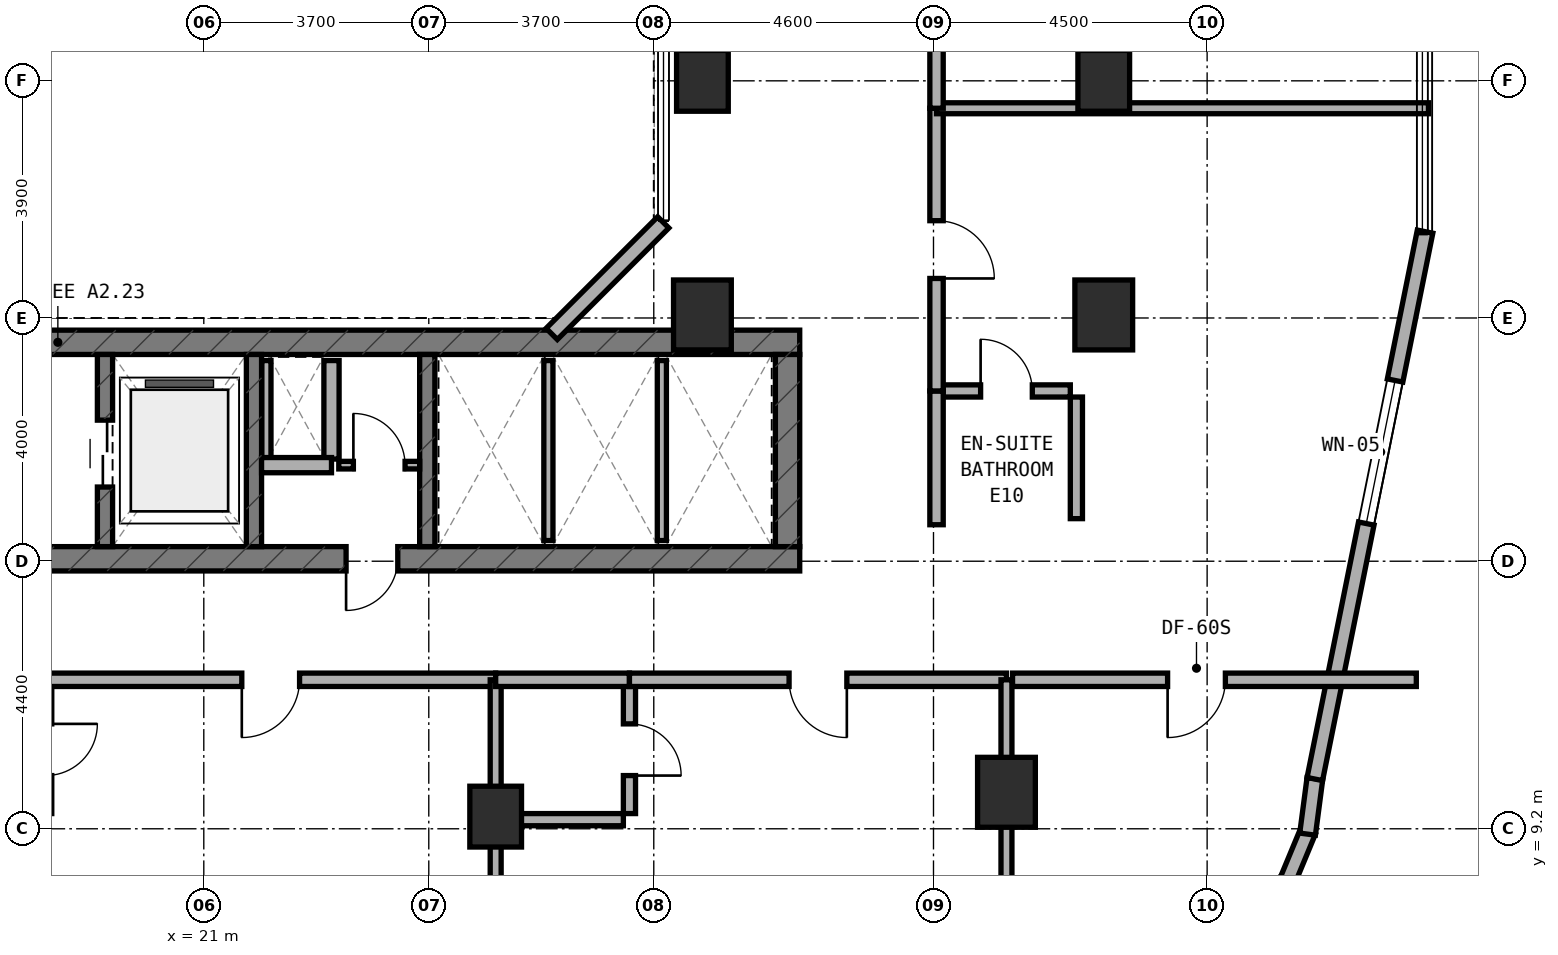
"""IFC4 building model, lengths in metres.
Left out: names, types, materials, properties, quantities, classifications, styles, units other than length and angle.
Written with IfcOpenShell. Run it as: python <this file> out.ifc"""

import sys

from ifc_helpers import new_model, si_unit, direction, frame, frame_2d, origin, origin_2d, place, context, subcontext, project, spatial, rectangle, extrude, element, fill, save


model = new_model("IFC4")
c1 = context("Model", 3, precision=1e-05, world=origin(), true_north=direction((0.0, 1.0)))
c2 = subcontext(c1, "Body", "Model", "MODEL_VIEW")
j1 = project(units=[si_unit("LENGTHUNIT", "METRE"), si_unit("PLANEANGLEUNIT", "RADIAN")], contexts=[c1])
p1 = place(None, origin())
s1 = spatial("IfcSite", under=j1, at=p1, CompositionType="ELEMENT")
p2 = place(p1, origin())
s2 = spatial("IfcBuilding", under=s1, at=p2, CompositionType="ELEMENT")
p3 = place(p2, frame((0.0, 0.0, 98.5)))
s3 = spatial("IfcBuildingStorey", under=s2, at=p3, CompositionType="ELEMENT", Elevation=98.5)
p4 = place(p3, frame((6.4, 13.64, 0.0), z_axis=(0.0, 0.0, 1.0), x_axis=(1.0, 0.0, 0.0)))
e1 = element("IfcWall", 1, at=p4, inside=s3, PredefinedType="SHEAR", context=c2, shape_type="SweptSolid", body=[
    extrude(rectangle(XDim=24.4, YDim=0.4, at=frame_2d((12.2, 0.0))), origin(), (0.0, 0.0, 1.0), 3.5),
])
p5 = place(p4, frame((9.15, 0.0, 0.0)))
e2 = element("IfcOpeningElement", 2, at=p5, cuts=e1, PredefinedType="OPENING", context=c2, shape_type="SweptSolid", body=[
    extrude(rectangle(XDim=1.2, YDim=2.15, at=frame_2d((0.6, 1.075))), frame((0.0, 0.21, 0.0), z_axis=(0.0, -1.0, 0.0), x_axis=(1.0, 0.0, 0.0)), (0.0, 0.0, 1.0), 0.42),
])
p6 = place(p4, frame((16.94, 0.0, 0.0)))
e3 = element("IfcOpeningElement", 3, at=p6, cuts=e1, PredefinedType="OPENING", context=c2, shape_type="SweptSolid", body=[
    extrude(rectangle(XDim=0.85, YDim=2.1, at=frame_2d((0.425, 1.05))), frame((0.0, 0.21, 0.0), z_axis=(0.0, -1.0, 0.0), x_axis=(1.0, 0.0, 0.0)), (0.0, 0.0, 1.0), 0.42),
])
p7 = place(p3, frame((6.4, 17.2, 0.0), z_axis=(0.0, 0.0, 1.0), x_axis=(1.0, 0.0, 0.0)))
e4 = element("IfcWall", 4, at=p7, inside=s3, PredefinedType="SHEAR", context=c2, shape_type="SweptSolid", body=[
    extrude(rectangle(XDim=24.4, YDim=0.4, at=frame_2d((12.2, 0.0))), origin(), (0.0, 0.0, 1.0), 3.5),
])
p8 = place(p3, frame((30.6, 13.84, 0.0), z_axis=(0.0, 0.0, 1.0), x_axis=(0.0, 1.0, 0.0)))
e5 = element("IfcWall", 5, at=p8, inside=s3, PredefinedType="SHEAR", context=c2, shape_type="SweptSolid", body=[
    extrude(rectangle(XDim=3.16, YDim=0.4, at=frame_2d((1.58, 0.0))), origin(), (0.0, 0.0, 1.0), 3.5),
])
p9 = place(p3, frame((19.375, 13.84, 0.0), z_axis=(0.0, 0.0, 1.0), x_axis=(0.0, 1.0, 0.0)))
e6 = element("IfcWall", 6, at=p9, inside=s3, PredefinedType="STANDARD", context=c2, shape_type="SweptSolid", body=[
    extrude(rectangle(XDim=3.16, YDim=0.25, at=frame_2d((1.58, 0.0))), origin(), (0.0, 0.0, 1.0), 3.22),
])
p10 = place(p9, frame((0.98, 0.0, 0.0)))
e7 = element("IfcOpeningElement", 7, at=p10, cuts=e6, PredefinedType="OPENING", context=c2, shape_type="SweptSolid", body=[
    extrude(rectangle(XDim=1.1, YDim=2.15, at=frame_2d((0.55, 1.075))), frame((0.0, 0.135, 0.0), z_axis=(0.0, -1.0, 0.0), x_axis=(1.0, 0.0, 0.0)), (0.0, 0.0, 1.0), 0.27),
])
for number, where, z_axis, x_axis in (
    (8, (21.825, 13.84, 0.0), (0.0, 0.0, 1.0), (0.0, 1.0, 0.0)),
    (9, (24.675, 13.84, 0.0), (0.0, 0.0, 1.0), (0.0, 1.0, 0.0)),
):
    element("IfcWall", number, at=place(p3, frame(where, z_axis=z_axis, x_axis=x_axis)), inside=s3, PredefinedType="STANDARD", context=c2, shape_type="SweptSolid", body=[
        extrude(rectangle(XDim=3.16, YDim=0.25, at=frame_2d((1.58, 0.0))), origin(), (0.0, 0.0, 1.0), 3.22),
    ])
p11 = place(p3, frame((25.8, 9.4, 0.0), z_axis=(0.0, 0.0, 1.0), x_axis=(1.0, 0.0, 0.0)))
e10 = element("IfcColumn", 10, at=p11, inside=s3, PredefinedType="COLUMN", context=c2, shape_type="SweptSolid", body=[
    extrude(rectangle(XDim=0.85, YDim=1.0, at=origin_2d()), origin(), (0.0, 0.0, 1.0), 3.5),
])
p12 = place(p3, frame((34.2, 9.8, 0.0), z_axis=(0.0, 0.0, 1.0), x_axis=(1.0, 0.0, 0.0)))
e11 = element("IfcColumn", 11, at=p12, inside=s3, PredefinedType="COLUMN", context=c2, shape_type="SweptSolid", body=[
    extrude(rectangle(XDim=0.95, YDim=1.15, at=origin_2d()), origin(), (0.0, 0.0, 1.0), 3.5),
])
p13 = place(p3, frame((35.8, 21.5, 0.0), z_axis=(0.0, 0.0, 1.0), x_axis=(1.0, 0.0, 0.0)))
e12 = element("IfcColumn", 12, at=p13, inside=s3, PredefinedType="COLUMN", context=c2, shape_type="SweptSolid", body=[
    extrude(rectangle(XDim=0.85, YDim=1.0, at=origin_2d()), origin(), (0.0, 0.0, 1.0), 3.5),
])
for number, where, z_axis, x_axis in (
    (13, (35.8, 17.65, 0.0), (0.0, 0.0, 1.0), (1.0, 0.0, 0.0)),
    (14, (29.2, 17.65, 0.0), (0.0, 0.0, 1.0), (1.0, 0.0, 0.0)),
):
    element("IfcColumn", number, at=place(p3, frame(where, z_axis=z_axis, x_axis=x_axis)), inside=s3, PredefinedType="COLUMN", context=c2, shape_type="SweptSolid", body=[
        extrude(rectangle(XDim=0.95, YDim=1.15, at=origin_2d()), origin(), (0.0, 0.0, 1.0), 3.5),
    ])
p14 = place(p3, frame((29.2, 21.5, 0.0), z_axis=(0.0, 0.0, 1.0), x_axis=(1.0, 0.0, 0.0)))
e15 = element("IfcColumn", 15, at=p14, inside=s3, PredefinedType="COLUMN", context=c2, shape_type="SweptSolid", body=[
    extrude(rectangle(XDim=0.85, YDim=1.0, at=origin_2d()), origin(), (0.0, 0.0, 1.0), 3.5),
])
p15 = place(p3, frame((38.286, 7.655, 0.0), z_axis=(0.0, 0.0, 1.0), x_axis=(0.608494022858, 0.793558456666, 0.0)))
e16 = element("IfcWall", 16, at=p15, inside=s3, PredefinedType="STANDARD", context=c2, shape_type="SweptSolid", body=[
    extrude(rectangle(XDim=0.902, YDim=0.26, at=frame_2d((0.451, 0.0))), origin(), (0.0, 0.0, 1.0), 3.22),
])
p16 = place(p3, frame((38.814, 8.327, 0.0), z_axis=(0.0, 0.0, 1.0), x_axis=(0.383155708213, 0.923683767999, 0.0)))
e17 = element("IfcWall", 17, at=p16, inside=s3, PredefinedType="STANDARD", context=c2, shape_type="SweptSolid", body=[
    extrude(rectangle(XDim=0.903, YDim=0.26, at=frame_2d((0.451, 0.0))), origin(), (0.0, 0.0, 1.0), 3.22),
])
p17 = place(p3, frame((39.152, 9.112, 0.0), z_axis=(0.0, 0.0, 1.0), x_axis=(0.130200706103, 0.991487658083, 0.0)))
e18 = element("IfcWall", 18, at=p17, inside=s3, PredefinedType="STANDARD", context=c2, shape_type="SweptSolid", body=[
    extrude(rectangle(XDim=0.921, YDim=0.26, at=frame_2d((0.46, 0.0))), origin(), (0.0, 0.0, 1.0), 3.22),
])
p18 = place(p3, frame((39.271, 10.018, 0.0), z_axis=(0.0, 0.0, 1.0), x_axis=(0.197435082048, 0.980315963543, 0.0)))
e19 = element("IfcWall", 19, at=p18, inside=s3, PredefinedType="STANDARD", context=c2, shape_type="SweptSolid", body=[
    extrude(rectangle(XDim=9.183, YDim=0.26, at=frame_2d((4.591, 0.0))), origin(), (0.0, 0.0, 1.0), 3.22),
])
p19 = place(p18, frame((4.286, 0.0, 0.8)))
e20 = element("IfcOpeningElement", 20, at=p19, cuts=e19, PredefinedType="OPENING", context=c2, shape_type="SweptSolid", body=[
    extrude(rectangle(XDim=2.4, YDim=1.6, at=frame_2d((1.2, 0.8))), frame((0.0, 0.14, 0.0), z_axis=(0.0, -1.0, 0.0), x_axis=(1.0, 0.0, 0.0)), (0.0, 0.0, 1.0), 0.28),
])
p20 = place(p3, frame((26.722, 17.338, 0.0), z_axis=(0.0, 0.0, 1.0), x_axis=(0.707059717605, 0.707153841636, 0.0)))
e21 = element("IfcWall", 21, at=p20, inside=s3, PredefinedType="STANDARD", context=c2, shape_type="SweptSolid", body=[
    extrude(rectangle(XDim=2.594, YDim=0.26, at=frame_2d((1.297, 0.0))), origin(), (0.0, 0.0, 1.0), 3.22),
])
p21 = place(p3, frame((22.03, 15.28, 0.0), z_axis=(0.0, 0.0, 1.0), x_axis=(0.0, 1.0, 0.0)))
e22 = element("IfcWall", 22, at=p21, inside=s3, PredefinedType="PARTITIONING", context=c2, shape_type="SweptSolid", body=[
    extrude(rectangle(XDim=1.62, YDim=0.15, at=frame_2d((0.81, 0.0))), origin(), (0.0, 0.0, 1.0), 3.22),
])
p22 = place(p3, frame((23.1, 15.28, 0.0), z_axis=(0.0, 0.0, 1.0), x_axis=(0.0, 1.0, 0.0)))
e23 = element("IfcWall", 23, at=p22, inside=s3, PredefinedType="SOLIDWALL", context=c2, shape_type="SweptSolid", body=[
    extrude(rectangle(XDim=1.62, YDim=0.25, at=frame_2d((0.81, 0.0))), origin(), (0.0, 0.0, 1.0), 3.22),
])
p23 = place(p3, frame((21.95, 15.18, 0.0), z_axis=(0.0, 0.0, 1.0), x_axis=(1.0, 0.0, 0.0)))
e24 = element("IfcWall", 24, at=p23, inside=s3, PredefinedType="SOLIDWALL", context=c2, shape_type="SweptSolid", body=[
    extrude(rectangle(XDim=1.15, YDim=0.25, at=frame_2d((0.575, 0.0))), origin(), (0.0, 0.0, 1.0), 3.22),
])
p24 = place(p3, frame((23.22, 15.18, 0.0), z_axis=(0.0, 0.0, 1.0), x_axis=(1.0, 0.0, 0.0)))
e25 = element("IfcWall", 25, at=p24, inside=s3, PredefinedType="PARTITIONING", context=c2, shape_type="SweptSolid", body=[
    extrude(rectangle(XDim=1.33, YDim=0.125, at=frame_2d((0.665, 0.0))), origin(), (0.0, 0.0, 1.0), 3.22),
])
p25 = place(p24, frame((0.24, 0.0, 0.0)))
e26 = element("IfcOpeningElement", 26, at=p25, cuts=e25, PredefinedType="OPENING", context=c2, shape_type="SweptSolid", body=[
    extrude(rectangle(XDim=0.85, YDim=2.1, at=frame_2d((0.425, 1.05))), frame((0.0, 0.073, 0.0), z_axis=(0.0, -1.0, 0.0), x_axis=(1.0, 0.0, 0.0)), (0.0, 0.0, 1.0), 0.145),
])
p26 = place(p3, frame((26.667, 13.94, 0.0), z_axis=(0.0, 0.0, 1.0), x_axis=(0.0, 1.0, 0.0)))
e27 = element("IfcWall", 27, at=p26, inside=s3, PredefinedType="PARTITIONING", context=c2, shape_type="SweptSolid", body=[
    extrude(rectangle(XDim=2.96, YDim=0.15, at=frame_2d((1.48, 0.0))), origin(), (0.0, 0.0, 1.0), 3.22),
])
p27 = place(p3, frame((28.533, 13.94, 0.0), z_axis=(0.0, 0.0, 1.0), x_axis=(0.0, 1.0, 0.0)))
e28 = element("IfcWall", 28, at=p27, inside=s3, PredefinedType="PARTITIONING", context=c2, shape_type="SweptSolid", body=[
    extrude(rectangle(XDim=2.96, YDim=0.15, at=frame_2d((1.48, 0.0))), origin(), (0.0, 0.0, 1.0), 2.595),
])
p28 = place(p3, frame((18.4, 11.65, 0.0), z_axis=(0.0, 0.0, 1.0), x_axis=(1.0, 0.0, 0.0)))
e29 = element("IfcWall", 29, at=p28, inside=s3, PredefinedType="SOLIDWALL", context=c2, shape_type="SweptSolid", body=[
    extrude(rectangle(XDim=7.4, YDim=0.22, at=frame_2d((3.7, 0.0))), origin(), (0.0, 0.0, 1.0), 2.595),
])
p29 = place(p28, frame((3.225, 0.0, 0.0)))
e30 = element("IfcOpeningElement", 30, at=p29, cuts=e29, PredefinedType="OPENING", context=c2, shape_type="SweptSolid", body=[
    extrude(rectangle(XDim=0.95, YDim=2.1, at=frame_2d((0.475, 1.05))), frame((0.0, 0.12, 0.0), z_axis=(0.0, -1.0, 0.0), x_axis=(1.0, 0.0, 0.0)), (0.0, 0.0, 1.0), 0.24),
])
p30 = place(p3, frame((25.8, 4.86, 0.0), z_axis=(0.0, 0.0, 1.0), x_axis=(0.0, 1.0, 0.0)))
e31 = element("IfcWall", 31, at=p30, inside=s3, PredefinedType="SOLIDWALL", context=c2, shape_type="SweptSolid", body=[
    extrude(rectangle(XDim=6.79, YDim=0.18, at=frame_2d((3.395, 0.0))), origin(), (0.0, 0.0, 1.0), 2.595),
])
p31 = place(p3, frame((28.0, 9.45, 0.0), z_axis=(0.0, 0.0, 1.0), x_axis=(0.0, 1.0, 0.0)))
e32 = element("IfcWall", 32, at=p31, inside=s3, PredefinedType="PLUMBINGWALL", context=c2, shape_type="SweptSolid", body=[
    extrude(rectangle(XDim=2.1, YDim=0.2, at=frame_2d((1.05, 0.0))), origin(), (0.0, 0.0, 1.0), 2.835),
])
p32 = place(p31, frame((0.625, 0.0, 0.0)))
e33 = element("IfcOpeningElement", 33, at=p32, cuts=e32, PredefinedType="OPENING", context=c2, shape_type="SweptSolid", body=[
    extrude(rectangle(XDim=0.85, YDim=2.1, at=frame_2d((0.425, 1.05))), frame((0.0, 0.11, 0.0), z_axis=(0.0, -1.0, 0.0), x_axis=(1.0, 0.0, 0.0)), (0.0, 0.0, 1.0), 0.22),
])
p33 = place(p3, frame((25.9, 9.35, 0.0), z_axis=(0.0, 0.0, 1.0), x_axis=(1.0, 0.0, 0.0)))
e34 = element("IfcWall", 34, at=p33, inside=s3, PredefinedType="PLUMBINGWALL", context=c2, shape_type="SweptSolid", body=[
    extrude(rectangle(XDim=2.0, YDim=0.2, at=frame_2d((1.0, 0.0))), origin(), (0.0, 0.0, 1.0), 2.835),
])
p34 = place(p3, frame((25.8, 11.65, 0.0), z_axis=(0.0, 0.0, 1.0), x_axis=(1.0, 0.0, 0.0)))
e35 = element("IfcWall", 35, at=p34, inside=s3, PredefinedType="SOLIDWALL", context=c2, shape_type="SweptSolid", body=[
    extrude(rectangle(XDim=2.2, YDim=0.22, at=frame_2d((1.1, 0.0))), origin(), (0.0, 0.0, 1.0), 2.595),
])
p35 = place(p3, frame((28.0, 11.65, 0.0), z_axis=(0.0, 0.0, 1.0), x_axis=(1.0, 0.0, 0.0)))
e36 = element("IfcWall", 36, at=p35, inside=s3, PredefinedType="SOLIDWALL", context=c2, shape_type="SweptSolid", body=[
    extrude(rectangle(XDim=6.2, YDim=0.22, at=frame_2d((3.1, 0.0))), origin(), (0.0, 0.0, 1.0), 2.595),
])
p36 = place(p35, frame((2.625, 0.0, 0.0)))
e37 = element("IfcOpeningElement", 37, at=p36, cuts=e36, PredefinedType="OPENING", context=c2, shape_type="SweptSolid", body=[
    extrude(rectangle(XDim=0.95, YDim=2.1, at=frame_2d((0.475, 1.05))), frame((0.0, 0.12, 0.0), z_axis=(0.0, -1.0, 0.0), x_axis=(1.0, 0.0, 0.0)), (0.0, 0.0, 1.0), 0.24),
])
p37 = place(p3, frame((34.2, 6.299, 0.0), z_axis=(0.0, 0.0, 1.0), x_axis=(0.0, 1.0, 0.0)))
e38 = element("IfcWall", 38, at=p37, inside=s3, PredefinedType="SOLIDWALL", context=c2, shape_type="SweptSolid", body=[
    extrude(rectangle(XDim=5.351, YDim=0.18, at=frame_2d((2.675, 0.0))), origin(), (0.0, 0.0, 1.0), 2.595),
])
p38 = place(p3, frame((34.3, 11.65, 0.0), z_axis=(0.0, 0.0, 1.0), x_axis=(1.0, 0.0, 0.0)))
e39 = element("IfcWall", 39, at=p38, inside=s3, PredefinedType="SOLIDWALL", context=c2, shape_type="SweptSolid", body=[
    extrude(rectangle(XDim=6.64, YDim=0.22, at=frame_2d((3.32, 0.0))), origin(), (0.0, 0.0, 1.0), 2.835),
])
p39 = place(p38, frame((2.55, 0.0, 0.0)))
e40 = element("IfcOpeningElement", 40, at=p39, cuts=e39, PredefinedType="OPENING", context=c2, shape_type="SweptSolid", body=[
    extrude(rectangle(XDim=0.95, YDim=2.1, at=frame_2d((0.475, 1.05))), frame((0.0, 0.12, 0.0), z_axis=(0.0, -1.0, 0.0), x_axis=(1.0, 0.0, 0.0)), (0.0, 0.0, 1.0), 0.24),
])
p40 = place(p3, frame((33.15, 16.4, 0.0), z_axis=(0.0, 0.0, 1.0), x_axis=(1.0, 0.0, 0.0)))
e41 = element("IfcWall", 41, at=p40, inside=s3, PredefinedType="PLUMBINGWALL", context=c2, shape_type="SweptSolid", body=[
    extrude(rectangle(XDim=2.1, YDim=0.2, at=frame_2d((1.05, 0.0))), origin(), (0.0, 0.0, 1.0), 3.22),
])
p41 = place(p40, frame((0.625, 0.0, 0.0)))
e42 = element("IfcOpeningElement", 42, at=p41, cuts=e41, PredefinedType="OPENING", context=c2, shape_type="SweptSolid", body=[
    extrude(rectangle(XDim=0.85, YDim=2.1, at=frame_2d((0.425, 1.05))), frame((0.0, 0.11, 0.0), z_axis=(0.0, -1.0, 0.0), x_axis=(1.0, 0.0, 0.0)), (0.0, 0.0, 1.0), 0.22),
])
p42 = place(p3, frame((35.35, 14.3, 0.0), z_axis=(0.0, 0.0, 1.0), x_axis=(0.0, 1.0, 0.0)))
e43 = element("IfcWall", 43, at=p42, inside=s3, PredefinedType="PLUMBINGWALL", context=c2, shape_type="SweptSolid", body=[
    extrude(rectangle(XDim=2.0, YDim=0.2, at=frame_2d((1.0, 0.0))), origin(), (0.0, 0.0, 1.0), 2.835),
])
p43 = place(p3, frame((33.05, 14.2, 0.0), z_axis=(0.0, 0.0, 1.0), x_axis=(0.0, 1.0, 0.0)))
e44 = element("IfcWall", 44, at=p43, inside=s3, PredefinedType="SOLIDWALL", context=c2, shape_type="SweptSolid", body=[
    extrude(rectangle(XDim=2.2, YDim=0.22, at=frame_2d((1.1, 0.0))), origin(), (0.0, 0.0, 1.0), 3.22),
])
p44 = place(p3, frame((33.05, 16.4, 0.0), z_axis=(0.0, 0.0, 1.0), x_axis=(0.0, 1.0, 0.0)))
e45 = element("IfcWall", 45, at=p44, inside=s3, PredefinedType="SOLIDWALL", context=c2, shape_type="SweptSolid", body=[
    extrude(rectangle(XDim=4.649, YDim=0.22, at=frame_2d((2.325, 0.0))), origin(), (0.0, 0.0, 1.0), 2.595),
])
p45 = place(p44, frame((1.85, 0.0, 0.0)))
e46 = element("IfcOpeningElement", 46, at=p45, cuts=e45, PredefinedType="OPENING", context=c2, shape_type="SweptSolid", body=[
    extrude(rectangle(XDim=0.95, YDim=2.1, at=frame_2d((0.475, 1.05))), frame((0.0, 0.12, 0.0), z_axis=(0.0, -1.0, 0.0), x_axis=(1.0, 0.0, 0.0)), (0.0, 0.0, 1.0), 0.24),
])
p46 = place(p3, frame((33.05, 21.049, 0.0), z_axis=(0.0, 0.0, 1.0), x_axis=(1.0, 0.0, 0.0)))
e47 = element("IfcWall", 47, at=p46, inside=s3, PredefinedType="SOLIDWALL", context=c2, shape_type="SweptSolid", body=[
    extrude(rectangle(XDim=8.09, YDim=0.18, at=frame_2d((4.045, 0.0))), origin(), (0.0, 0.0, 1.0), 2.835),
])
p47 = place(p3, frame((33.05, 21.049, 0.0), z_axis=(0.0, 0.0, 1.0), x_axis=(0.0, 1.0, 0.0)))
e48 = element("IfcWall", 48, at=p47, inside=s3, PredefinedType="SOLIDWALL", context=c2, shape_type="SweptSolid", body=[
    extrude(rectangle(XDim=5.144, YDim=0.22, at=frame_2d((2.572, 0.0))), origin(), (0.0, 0.0, 1.0), 2.595),
])
p48 = place(p47, frame((2.097, 0.0, 0.0)))
e49 = element("IfcOpeningElement", 49, at=p48, cuts=e48, PredefinedType="OPENING", context=c2, shape_type="SweptSolid", body=[
    extrude(rectangle(XDim=0.95, YDim=2.1, at=frame_2d((0.475, 1.05))), frame((0.0, 0.12, 0.0), z_axis=(0.0, -1.0, 0.0), x_axis=(1.0, 0.0, 0.0)), (0.0, 0.0, 1.0), 0.24),
])
p49 = place(p19, origin())
e50 = element("IfcWindow", 50, at=p49, inside=s3, PartitioningType="SINGLE_PANEL", PredefinedType="WINDOW", context=c2, shape_type="SweptSolid", body=[
    extrude(rectangle(XDim=2.4, YDim=1.6, at=frame_2d((1.2, 0.8))), frame((0.0, 0.03, 0.0), z_axis=(0.0, -1.0, 0.0), x_axis=(1.0, 0.0, 0.0)), (0.0, 0.0, 1.0), 0.06),
])
fill(e20, e50)
p50 = place(p10, origin())
e51 = element("IfcDoor", 51, at=p50, inside=s3, OperationType="DOUBLE_DOOR_SLIDING", PredefinedType="DOOR", context=c2, shape_type="SweptSolid", body=[
    extrude(rectangle(XDim=1.1, YDim=2.15, at=frame_2d((0.55, 1.075))), frame((0.0, 0.025, 0.0), z_axis=(0.0, -1.0, 0.0), x_axis=(1.0, 0.0, 0.0)), (0.0, 0.0, 1.0), 0.05),
])
fill(e7, e51)
p51 = place(p6, frame((0.85, 0.0, 0.0), z_axis=(0.0, 0.0, 1.0), x_axis=(-1.0, 0.0, 0.0)))
e52 = element("IfcDoor", 52, at=p51, inside=s3, OperationType="SINGLE_SWING_RIGHT", PredefinedType="DOOR", context=c2, shape_type="SweptSolid", body=[
    extrude(rectangle(XDim=0.85, YDim=2.1, at=frame_2d((0.425, 1.05))), frame((0.0, 0.025, 0.0), z_axis=(0.0, -1.0, 0.0), x_axis=(1.0, 0.0, 0.0)), (0.0, 0.0, 1.0), 0.05),
])
fill(e3, e52)
p52 = place(p25, origin())
e53 = element("IfcDoor", 53, at=p52, inside=s3, OperationType="SINGLE_SWING_LEFT", PredefinedType="DOOR", context=c2, shape_type="SweptSolid", body=[
    extrude(rectangle(XDim=0.85, YDim=2.1, at=frame_2d((0.425, 1.05))), frame((0.0, 0.025, 0.0), z_axis=(0.0, -1.0, 0.0), x_axis=(1.0, 0.0, 0.0)), (0.0, 0.0, 1.0), 0.05),
])
fill(e26, e53)
p53 = place(p29, frame((0.95, 0.0, 0.0), z_axis=(0.0, 0.0, 1.0), x_axis=(-1.0, 0.0, 0.0)))
e54 = element("IfcDoor", 54, at=p53, inside=s3, OperationType="SINGLE_SWING_RIGHT", PredefinedType="DOOR", context=c2, shape_type="SweptSolid", body=[
    extrude(rectangle(XDim=0.95, YDim=2.1, at=frame_2d((0.475, 1.05))), frame((0.0, 0.025, 0.0), z_axis=(0.0, -1.0, 0.0), x_axis=(1.0, 0.0, 0.0)), (0.0, 0.0, 1.0), 0.05),
])
fill(e30, e54)
p54 = place(p32, frame((0.85, 0.0, 0.0), z_axis=(0.0, 0.0, 1.0), x_axis=(-1.0, 0.0, 0.0)))
e55 = element("IfcDoor", 55, at=p54, inside=s3, OperationType="SINGLE_SWING_RIGHT", PredefinedType="DOOR", context=c2, shape_type="SweptSolid", body=[
    extrude(rectangle(XDim=0.85, YDim=2.1, at=frame_2d((0.425, 1.05))), frame((0.0, 0.025, 0.0), z_axis=(0.0, -1.0, 0.0), x_axis=(1.0, 0.0, 0.0)), (0.0, 0.0, 1.0), 0.05),
])
fill(e33, e55)
p55 = place(p36, frame((0.95, 0.0, 0.0), z_axis=(0.0, 0.0, 1.0), x_axis=(-1.0, 0.0, 0.0)))
e56 = element("IfcDoor", 56, at=p55, inside=s3, OperationType="SINGLE_SWING_LEFT", PredefinedType="DOOR", context=c2, shape_type="SweptSolid", body=[
    extrude(rectangle(XDim=0.95, YDim=2.1, at=frame_2d((0.475, 1.05))), frame((0.0, 0.025, 0.0), z_axis=(0.0, -1.0, 0.0), x_axis=(1.0, 0.0, 0.0)), (0.0, 0.0, 1.0), 0.05),
])
fill(e37, e56)
p56 = place(p39, frame((0.95, 0.0, 0.0), z_axis=(0.0, 0.0, 1.0), x_axis=(-1.0, 0.0, 0.0)))
e57 = element("IfcDoor", 57, at=p56, inside=s3, OperationType="SINGLE_SWING_RIGHT", PredefinedType="DOOR", context=c2, shape_type="SweptSolid", body=[
    extrude(rectangle(XDim=0.95, YDim=2.1, at=frame_2d((0.475, 1.05))), frame((0.0, 0.025, 0.0), z_axis=(0.0, -1.0, 0.0), x_axis=(1.0, 0.0, 0.0)), (0.0, 0.0, 1.0), 0.05),
])
fill(e40, e57)
p57 = place(p41, origin())
e58 = element("IfcDoor", 58, at=p57, inside=s3, OperationType="SINGLE_SWING_LEFT", PredefinedType="DOOR", context=c2, shape_type="SweptSolid", body=[
    extrude(rectangle(XDim=0.85, YDim=2.1, at=frame_2d((0.425, 1.05))), frame((0.0, 0.025, 0.0), z_axis=(0.0, -1.0, 0.0), x_axis=(1.0, 0.0, 0.0)), (0.0, 0.0, 1.0), 0.05),
])
fill(e42, e58)
p58 = place(p45, frame((0.95, 0.0, 0.0), z_axis=(0.0, 0.0, 1.0), x_axis=(-1.0, 0.0, 0.0)))
e59 = element("IfcDoor", 59, at=p58, inside=s3, OperationType="SINGLE_SWING_RIGHT", PredefinedType="DOOR", context=c2, shape_type="SweptSolid", body=[
    extrude(rectangle(XDim=0.95, YDim=2.1, at=frame_2d((0.475, 1.05))), frame((0.0, 0.025, 0.0), z_axis=(0.0, -1.0, 0.0), x_axis=(1.0, 0.0, 0.0)), (0.0, 0.0, 1.0), 0.05),
])
fill(e46, e59)
save(model, sys.argv[1])
